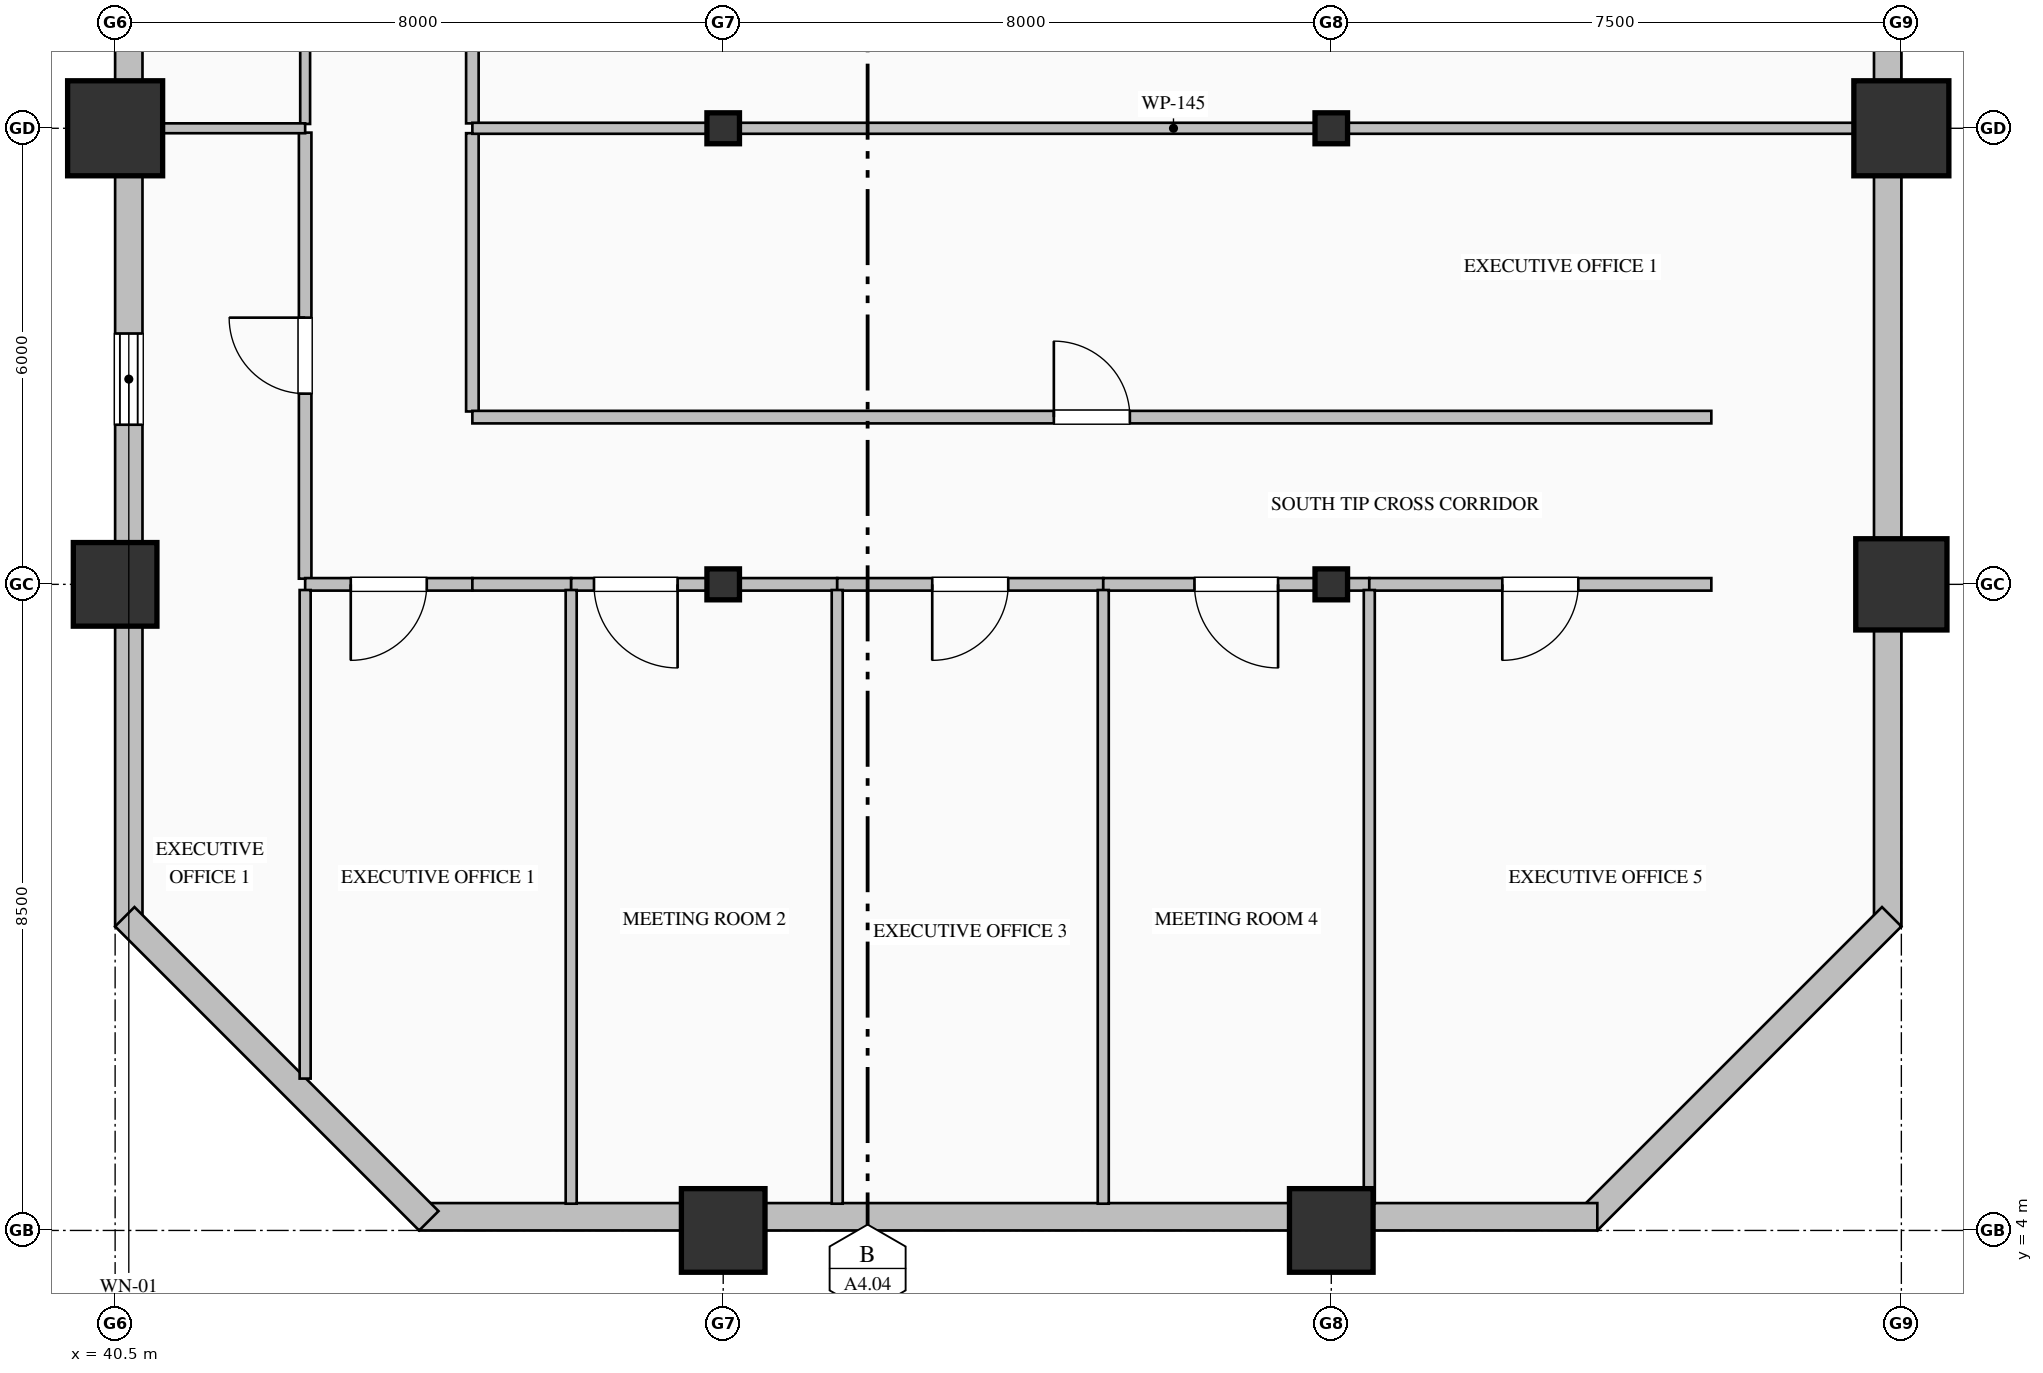
"""IFC4 building model, lengths in metres.
Left out: names, types, materials, properties, quantities, classifications, styles, units other than length and angle.
Written with IfcOpenShell. Run it as: python <this file> out.ifc"""

import sys

from ifc_helpers import new_model, si_unit, direction, frame, frame_2d, origin, origin_2d, place, context, subcontext, project, spatial, rectangle, hollow_rectangle, hollow_circle, i_section, extrude, element, fill, save


model = new_model("IFC4")
c1 = context("Model", 3, precision=1e-05, world=origin(), true_north=direction((0.0, 1.0)))
c2 = subcontext(c1, "Body", "Model", "MODEL_VIEW")
j1 = project(units=[si_unit("LENGTHUNIT", "METRE"), si_unit("PLANEANGLEUNIT", "RADIAN")], contexts=[c1])
p1 = place(None, origin())
s1 = spatial("IfcSite", under=j1, at=p1, CompositionType="ELEMENT")
p2 = place(p1, origin())
s2 = spatial("IfcBuilding", under=s1, at=p2, CompositionType="ELEMENT")
p3 = place(p2, frame((0.0, 0.0, 36.2)))
s3 = spatial("IfcBuildingStorey", under=s2, at=p3, CompositionType="ELEMENT", Elevation=36.2)
p4 = place(p3, frame((40.5, 12.5, 0.0), z_axis=(0.0, 0.0, 1.0), x_axis=(1.0, 0.0, 0.0)))
e1 = element("IfcColumn", 1, at=p4, inside=s3, PredefinedType="COLUMN", context=c2, shape_type="SweptSolid", body=[
    extrude(hollow_rectangle(XDim=1.1, YDim=1.1, WallThickness=0.04, at=origin_2d()), origin(), (0.0, 0.0, 1.0), 4.0),
])
p5 = place(p3, frame((40.5, 18.5, 0.0), z_axis=(0.0, 0.0, 1.0), x_axis=(1.0, 0.0, 0.0)))
e2 = element("IfcColumn", 2, at=p5, inside=s3, PredefinedType="COLUMN", context=c2, shape_type="SweptSolid", body=[
    extrude(hollow_rectangle(XDim=1.25, YDim=1.25, WallThickness=0.045, at=origin_2d()), origin(), (0.0, 0.0, 1.0), 4.0),
])
p6 = place(p3, frame((48.5, 4.0, 0.0), z_axis=(0.0, 0.0, 1.0), x_axis=(1.0, 0.0, 0.0)))
e3 = element("IfcColumn", 3, at=p6, inside=s3, PredefinedType="COLUMN", context=c2, shape_type="SweptSolid", body=[
    extrude(hollow_rectangle(XDim=1.1, YDim=1.1, WallThickness=0.04, at=origin_2d()), origin(), (0.0, 0.0, 1.0), 4.0),
])
for number, where, z_axis, x_axis in (
    (4, (48.5, 12.5, 0.0), (0.0, 0.0, 1.0), (1.0, 0.0, 0.0)),
    (5, (48.5, 18.5, 0.0), (0.0, 0.0, 1.0), (1.0, 0.0, 0.0)),
):
    element("IfcColumn", number, at=place(p3, frame(where, z_axis=z_axis, x_axis=x_axis)), inside=s3, PredefinedType="COLUMN", context=c2, shape_type="SweptSolid", body=[
        extrude(i_section(OverallWidth=0.407, OverallDepth=0.428, WebThickness=0.02, FlangeThickness=0.035, FilletRadius=0.022, at=origin_2d()), origin(), (0.0, 0.0, 1.0), 4.0),
    ])
p7 = place(p3, frame((56.5, 4.0, 0.0), z_axis=(0.0, 0.0, 1.0), x_axis=(1.0, 0.0, 0.0)))
e6 = element("IfcColumn", 6, at=p7, inside=s3, PredefinedType="COLUMN", context=c2, shape_type="SweptSolid", body=[
    extrude(hollow_rectangle(XDim=1.1, YDim=1.1, WallThickness=0.04, at=origin_2d()), origin(), (0.0, 0.0, 1.0), 4.0),
])
for number, where, z_axis, x_axis in (
    (7, (56.5, 12.5, 0.0), (0.0, 0.0, 1.0), (1.0, 0.0, 0.0)),
    (8, (56.5, 18.5, 0.0), (0.0, 0.0, 1.0), (1.0, 0.0, 0.0)),
):
    element("IfcColumn", number, at=place(p3, frame(where, z_axis=z_axis, x_axis=x_axis)), inside=s3, PredefinedType="COLUMN", context=c2, shape_type="SweptSolid", body=[
        extrude(i_section(OverallWidth=0.407, OverallDepth=0.428, WebThickness=0.02, FlangeThickness=0.035, FilletRadius=0.022, at=origin_2d()), origin(), (0.0, 0.0, 1.0), 4.0),
    ])
p8 = place(p3, frame((64.0, 12.5, 0.0), z_axis=(0.0, 0.0, 1.0), x_axis=(1.0, 0.0, 0.0)))
e9 = element("IfcColumn", 9, at=p8, inside=s3, PredefinedType="COLUMN", context=c2, shape_type="SweptSolid", body=[
    extrude(hollow_circle(Radius=0.6, WallThickness=0.04, at=origin_2d()), origin(), (0.0, 0.0, 1.0), 4.0),
])
p9 = place(p3, frame((64.0, 18.5, 0.0), z_axis=(0.0, 0.0, 1.0), x_axis=(1.0, 0.0, 0.0)))
e10 = element("IfcColumn", 10, at=p9, inside=s3, PredefinedType="COLUMN", context=c2, shape_type="SweptSolid", body=[
    extrude(hollow_rectangle(XDim=1.25, YDim=1.25, WallThickness=0.045, at=origin_2d()), origin(), (0.0, 0.0, 1.0), 4.0),
])
p10 = place(p3, frame((40.68, 8.0, 0.0), z_axis=(0.0, 0.0, 1.0), x_axis=(0.0, 1.0, 0.0)))
e11 = element("IfcWall", 11, at=p10, inside=s3, PredefinedType="SOLIDWALL", context=c2, shape_type="SweptSolid", body=[
    extrude(rectangle(XDim=20.36, YDim=0.36, at=frame_2d((10.18, 0.0))), origin(), (0.0, 0.0, 1.0), 3.05),
])
p11 = place(p10, frame((6.6, 0.0, 0.7)))
e12 = element("IfcOpeningElement", 12, at=p11, cuts=e11, PredefinedType="OPENING", context=c2, shape_type="SweptSolid", body=[
    extrude(rectangle(XDim=1.2, YDim=1.85, at=frame_2d((0.6, 0.925))), frame((0.0, 0.19, 0.0), z_axis=(0.0, -1.0, 0.0), x_axis=(1.0, 0.0, 0.0)), (0.0, 0.0, 1.0), 0.38),
])
p12 = place(p10, frame((13.8, 0.0, 0.7)))
e13 = element("IfcOpeningElement", 13, at=p12, cuts=e11, PredefinedType="OPENING", context=c2, shape_type="SweptSolid", body=[
    extrude(rectangle(XDim=1.2, YDim=1.85, at=frame_2d((0.6, 0.925))), frame((0.0, 0.19, 0.0), z_axis=(0.0, -1.0, 0.0), x_axis=(1.0, 0.0, 0.0)), (0.0, 0.0, 1.0), 0.38),
])
p13 = place(p3, frame((63.82, 36.05, 0.0), z_axis=(0.0, 0.0, 1.0), x_axis=(0.0, -1.0, 0.0)))
e14 = element("IfcWall", 14, at=p13, inside=s3, PredefinedType="SOLIDWALL", context=c2, shape_type="SweptSolid", body=[
    extrude(rectangle(XDim=28.05, YDim=0.36, at=frame_2d((14.025, 0.0))), origin(), (0.0, 0.0, 1.0), 3.25),
])
p14 = place(p13, frame((9.75, 0.0, 0.85)))
e15 = element("IfcOpeningElement", 15, at=p14, cuts=e14, PredefinedType="OPENING", context=c2, shape_type="SweptSolid", body=[
    extrude(rectangle(XDim=2.1, YDim=2.05, at=frame_2d((1.05, 1.025))), frame((0.0, 0.19, 0.0), z_axis=(0.0, -1.0, 0.0), x_axis=(1.0, 0.0, 0.0)), (0.0, 0.0, 1.0), 0.38),
])
p15 = place(p13, frame((13.2, 0.0, 0.8)))
e16 = element("IfcOpeningElement", 16, at=p15, cuts=e14, PredefinedType="OPENING", context=c2, shape_type="SweptSolid", body=[
    extrude(rectangle(XDim=2.4, YDim=2.15, at=frame_2d((1.2, 1.075))), frame((0.0, 0.19, 0.0), z_axis=(0.0, -1.0, 0.0), x_axis=(1.0, 0.0, 0.0)), (0.0, 0.0, 1.0), 0.38),
])
p16 = place(p3, frame((63.873, 8.127, 0.0), z_axis=(0.0, 0.0, 1.0), x_axis=(-0.707106781187, -0.707106781187, 0.0)))
e17 = element("IfcWall", 17, at=p16, inside=s3, PredefinedType="SOLIDWALL", context=c2, shape_type="SweptSolid", body=[
    extrude(rectangle(XDim=5.657, YDim=0.36, at=frame_2d((2.828, 0.0))), origin(), (0.0, 0.0, 1.0), 3.75),
])
p17 = place(p3, frame((60.0, 4.18, 0.0), z_axis=(0.0, 0.0, 1.0), x_axis=(-1.0, 0.0, 0.0)))
e18 = element("IfcWall", 18, at=p17, inside=s3, PredefinedType="SOLIDWALL", context=c2, shape_type="SweptSolid", body=[
    extrude(rectangle(XDim=15.5, YDim=0.36, at=frame_2d((7.75, 0.0))), origin(), (0.0, 0.0, 1.0), 3.25),
])
p18 = place(p3, frame((44.627, 4.127, 0.0), z_axis=(0.0, 0.0, 1.0), x_axis=(-0.707106781187, 0.707106781187, 0.0)))
e19 = element("IfcWall", 19, at=p18, inside=s3, PredefinedType="SOLIDWALL", context=c2, shape_type="SweptSolid", body=[
    extrude(rectangle(XDim=5.657, YDim=0.36, at=frame_2d((2.828, 0.0))), origin(), (0.0, 0.0, 1.0), 3.75),
])
p19 = place(p3, frame((45.2, 18.436, 0.0), z_axis=(0.0, 0.0, 1.0), x_axis=(0.0, -1.0, 0.0)))
e20 = element("IfcWall", 20, at=p19, inside=s3, PredefinedType="PARTITIONING", context=c2, shape_type="SweptSolid", body=[
    extrude(rectangle(XDim=3.661, YDim=0.165, at=frame_2d((1.831, 0.0))), origin(), (0.0, 0.0, 1.0), 3.75),
])
p20 = place(p3, frame((45.2, 23.135, 0.0), z_axis=(0.0, 0.0, 1.0), x_axis=(0.0, -1.0, 0.0)))
e21 = element("IfcWall", 21, at=p20, inside=s3, PredefinedType="PARTITIONING", context=c2, shape_type="SweptSolid", body=[
    extrude(rectangle(XDim=4.571, YDim=0.165, at=frame_2d((2.286, 0.0))), origin(), (0.0, 0.0, 1.0), 3.75),
])
p21 = place(p20, frame((1.736, 0.0, 0.0)))
e22 = element("IfcOpeningElement", 22, at=p21, cuts=e21, PredefinedType="OPENING", context=c2, shape_type="SweptSolid", body=[
    extrude(rectangle(XDim=1.1, YDim=2.2, at=frame_2d((0.55, 1.1))), frame((0.0, 0.093, 0.0), z_axis=(0.0, -1.0, 0.0), x_axis=(1.0, 0.0, 0.0)), (0.0, 0.0, 1.0), 0.185),
])
p22 = place(p3, frame((43.0, 12.574, 0.0), z_axis=(0.0, 0.0, 1.0), x_axis=(0.0, 1.0, 0.0)))
e23 = element("IfcWall", 23, at=p22, inside=s3, PredefinedType="PARTITIONING", context=c2, shape_type="SweptSolid", body=[
    extrude(rectangle(XDim=5.869, YDim=0.165, at=frame_2d((2.934, 0.0))), origin(), (0.0, 0.0, 1.0), 3.75),
])
p23 = place(p22, frame((2.434, 0.0, 0.0)))
e24 = element("IfcOpeningElement", 24, at=p23, cuts=e23, PredefinedType="OPENING", context=c2, shape_type="SweptSolid", body=[
    extrude(rectangle(XDim=1.0, YDim=2.15, at=frame_2d((0.5, 1.075))), frame((0.0, 0.093, 0.0), z_axis=(0.0, -1.0, 0.0), x_axis=(1.0, 0.0, 0.0)), (0.0, 0.0, 1.0), 0.185),
])
p24 = place(p3, frame((43.0, 18.557, 0.0), z_axis=(0.0, 0.0, 1.0), x_axis=(0.0, 1.0, 0.0)))
e25 = element("IfcWall", 25, at=p24, inside=s3, PredefinedType="PARTITIONING", context=c2, shape_type="SweptSolid", body=[
    extrude(rectangle(XDim=5.886, YDim=0.13, at=frame_2d((2.943, 0.0))), origin(), (0.0, 0.0, 1.0), 3.75),
])
p25 = place(p24, frame((2.443, 0.0, 0.0)))
e26 = element("IfcOpeningElement", 26, at=p25, cuts=e25, PredefinedType="OPENING", context=c2, shape_type="SweptSolid", body=[
    extrude(rectangle(XDim=1.0, YDim=2.15, at=frame_2d((0.5, 1.075))), frame((0.0, 0.075, 0.0), z_axis=(0.0, -1.0, 0.0), x_axis=(1.0, 0.0, 0.0)), (0.0, 0.0, 1.0), 0.15),
])
p26 = place(p3, frame((45.2, 12.5, 0.0), z_axis=(0.0, 0.0, 1.0), x_axis=(-1.0, 0.0, 0.0)))
e27 = element("IfcWall", 27, at=p26, inside=s3, PredefinedType="PARTITIONING", context=c2, shape_type="SweptSolid", body=[
    extrude(rectangle(XDim=2.2, YDim=0.165, at=frame_2d((1.1, 0.0))), origin(), (0.0, 0.0, 1.0), 3.042),
])
p27 = place(p26, frame((0.6, 0.0, 0.0)))
e28 = element("IfcOpeningElement", 28, at=p27, cuts=e27, PredefinedType="OPENING", context=c2, shape_type="SweptSolid", body=[
    extrude(rectangle(XDim=1.0, YDim=2.15, at=frame_2d((0.5, 1.075))), frame((0.0, 0.093, 0.0), z_axis=(0.0, -1.0, 0.0), x_axis=(1.0, 0.0, 0.0)), (0.0, 0.0, 1.0), 0.185),
])
p28 = place(p3, frame((45.2, 14.7, 0.0), z_axis=(0.0, 0.0, 1.0), x_axis=(1.0, 0.0, 0.0)))
e29 = element("IfcWall", 29, at=p28, inside=s3, PredefinedType="PARTITIONING", context=c2, shape_type="SweptSolid", body=[
    extrude(rectangle(XDim=16.3, YDim=0.165, at=frame_2d((8.15, 0.0))), origin(), (0.0, 0.0, 1.0), 3.75),
])
p29 = place(p28, frame((7.65, 0.0, 0.0)))
e30 = element("IfcOpeningElement", 30, at=p29, cuts=e29, PredefinedType="OPENING", context=c2, shape_type="SweptSolid", body=[
    extrude(rectangle(XDim=1.0, YDim=2.15, at=frame_2d((0.5, 1.075))), frame((0.0, 0.093, 0.0), z_axis=(0.0, -1.0, 0.0), x_axis=(1.0, 0.0, 0.0)), (0.0, 0.0, 1.0), 0.185),
])
p30 = place(p3, frame((46.5, 12.5, 0.0), z_axis=(0.0, 0.0, 1.0), x_axis=(-1.0, 0.0, 0.0)))
e31 = element("IfcWall", 31, at=p30, inside=s3, PredefinedType="PARTITIONING", context=c2, shape_type="SweptSolid", body=[
    extrude(rectangle(XDim=1.3, YDim=0.165, at=frame_2d((0.65, 0.0))), origin(), (0.0, 0.0, 1.0), 3.042),
])
p31 = place(p3, frame((50.0, 12.5, 0.0), z_axis=(0.0, 0.0, 1.0), x_axis=(-1.0, 0.0, 0.0)))
e32 = element("IfcWall", 32, at=p31, inside=s3, PredefinedType="PARTITIONING", context=c2, shape_type="SweptSolid", body=[
    extrude(rectangle(XDim=3.5, YDim=0.165, at=frame_2d((1.75, 0.0))), origin(), (0.0, 0.0, 1.0), 3.042),
])
p32 = place(p31, frame((2.1, 0.0, 0.0)))
e33 = element("IfcOpeningElement", 33, at=p32, cuts=e32, PredefinedType="OPENING", context=c2, shape_type="SweptSolid", body=[
    extrude(rectangle(XDim=1.1, YDim=2.2, at=frame_2d((0.55, 1.1))), frame((0.0, 0.093, 0.0), z_axis=(0.0, -1.0, 0.0), x_axis=(1.0, 0.0, 0.0)), (0.0, 0.0, 1.0), 0.185),
])
p33 = place(p3, frame((53.5, 12.5, 0.0), z_axis=(0.0, 0.0, 1.0), x_axis=(-1.0, 0.0, 0.0)))
e34 = element("IfcWall", 34, at=p33, inside=s3, PredefinedType="PARTITIONING", context=c2, shape_type="SweptSolid", body=[
    extrude(rectangle(XDim=3.5, YDim=0.165, at=frame_2d((1.75, 0.0))), origin(), (0.0, 0.0, 1.0), 3.042),
])
p34 = place(p33, frame((1.25, 0.0, 0.0)))
e35 = element("IfcOpeningElement", 35, at=p34, cuts=e34, PredefinedType="OPENING", context=c2, shape_type="SweptSolid", body=[
    extrude(rectangle(XDim=1.0, YDim=2.15, at=frame_2d((0.5, 1.075))), frame((0.0, 0.093, 0.0), z_axis=(0.0, -1.0, 0.0), x_axis=(1.0, 0.0, 0.0)), (0.0, 0.0, 1.0), 0.185),
])
p35 = place(p3, frame((57.0, 12.5, 0.0), z_axis=(0.0, 0.0, 1.0), x_axis=(-1.0, 0.0, 0.0)))
e36 = element("IfcWall", 36, at=p35, inside=s3, PredefinedType="PARTITIONING", context=c2, shape_type="SweptSolid", body=[
    extrude(rectangle(XDim=3.5, YDim=0.165, at=frame_2d((1.75, 0.0))), origin(), (0.0, 0.0, 1.0), 3.042),
])
p36 = place(p35, frame((1.2, 0.0, 0.0)))
e37 = element("IfcOpeningElement", 37, at=p36, cuts=e36, PredefinedType="OPENING", context=c2, shape_type="SweptSolid", body=[
    extrude(rectangle(XDim=1.1, YDim=2.2, at=frame_2d((0.55, 1.1))), frame((0.0, 0.093, 0.0), z_axis=(0.0, -1.0, 0.0), x_axis=(1.0, 0.0, 0.0)), (0.0, 0.0, 1.0), 0.185),
])
p37 = place(p3, frame((61.5, 12.5, 0.0), z_axis=(0.0, 0.0, 1.0), x_axis=(-1.0, 0.0, 0.0)))
e38 = element("IfcWall", 38, at=p37, inside=s3, PredefinedType="PARTITIONING", context=c2, shape_type="SweptSolid", body=[
    extrude(rectangle(XDim=4.5, YDim=0.165, at=frame_2d((2.25, 0.0))), origin(), (0.0, 0.0, 1.0), 3.042),
])
p38 = place(p37, frame((1.75, 0.0, 0.0)))
e39 = element("IfcOpeningElement", 39, at=p38, cuts=e38, PredefinedType="OPENING", context=c2, shape_type="SweptSolid", body=[
    extrude(rectangle(XDim=1.0, YDim=2.15, at=frame_2d((0.5, 1.075))), frame((0.0, 0.093, 0.0), z_axis=(0.0, -1.0, 0.0), x_axis=(1.0, 0.0, 0.0)), (0.0, 0.0, 1.0), 0.185),
])
p39 = place(p3, frame((45.2, 18.5, 0.0), z_axis=(0.0, 0.0, 1.0), x_axis=(1.0, 0.0, 0.0)))
e40 = element("IfcWall", 40, at=p39, inside=s3, PredefinedType="PARTITIONING", context=c2, shape_type="SweptSolid", body=[
    extrude(rectangle(XDim=18.448, YDim=0.145, at=frame_2d((9.224, 0.0))), origin(), (0.0, 0.0, 1.0), 3.042),
])
p40 = place(p3, frame((40.852, 18.5, 0.0), z_axis=(0.0, 0.0, 1.0), x_axis=(1.0, 0.0, 0.0)))
e41 = element("IfcWall", 41, at=p40, inside=s3, PredefinedType="PARTITIONING", context=c2, shape_type="SweptSolid", body=[
    extrude(rectangle(XDim=2.148, YDim=0.13, at=frame_2d((1.074, 0.0))), origin(), (0.0, 0.0, 1.0), 3.042),
])
p41 = place(p3, frame((43.0, 12.426, 0.0), z_axis=(0.0, 0.0, 1.0), x_axis=(0.0, -1.0, 0.0)))
e42 = element("IfcWall", 42, at=p41, inside=s3, PredefinedType="PARTITIONING", context=c2, shape_type="SweptSolid", body=[
    extrude(rectangle(XDim=6.428, YDim=0.145, at=frame_2d((3.214, 0.0))), origin(), (0.0, 0.0, 1.0), 3.75),
])
for number, where, z_axis, x_axis in (
    (43, (46.5, 12.426, 0.0), (0.0, 0.0, 1.0), (0.0, -1.0, 0.0)),
    (44, (50.0, 12.426, 0.0), (0.0, 0.0, 1.0), (0.0, -1.0, 0.0)),
    (45, (53.5, 12.426, 0.0), (0.0, 0.0, 1.0), (0.0, -1.0, 0.0)),
    (46, (57.0, 12.426, 0.0), (0.0, 0.0, 1.0), (0.0, -1.0, 0.0)),
):
    element("IfcWall", number, at=place(p3, frame(where, z_axis=z_axis, x_axis=x_axis)), inside=s3, PredefinedType="PARTITIONING", context=c2, shape_type="SweptSolid", body=[
        extrude(rectangle(XDim=8.073, YDim=0.145, at=frame_2d((4.037, 0.0))), origin(), (0.0, 0.0, 1.0), 3.75),
    ])
p42 = place(p11, origin())
e47 = element("IfcWindow", 47, at=p42, inside=s3, PartitioningType="DOUBLE_PANEL_VERTICAL", PredefinedType="WINDOW", context=c2, shape_type="SweptSolid", body=[
    extrude(rectangle(XDim=1.2, YDim=1.85, at=frame_2d((0.6, 0.925))), frame((0.0, 0.15, 0.0), z_axis=(0.0, -1.0, 0.0), x_axis=(1.0, 0.0, 0.0)), (0.0, 0.0, 1.0), 0.06),
])
fill(e12, e47)
p43 = place(p29, origin())
e48 = element("IfcDoor", 48, at=p43, inside=s3, OperationType="SINGLE_SWING_LEFT", PredefinedType="DOOR", context=c2, shape_type="SweptSolid", body=[
    extrude(rectangle(XDim=1.0, YDim=2.15, at=frame_2d((0.5, 1.075))), frame((0.0, 0.025, 0.0), z_axis=(0.0, -1.0, 0.0), x_axis=(1.0, 0.0, 0.0)), (0.0, 0.0, 1.0), 0.05),
])
fill(e30, e48)
p44 = place(p23, origin())
e49 = element("IfcDoor", 49, at=p44, inside=s3, OperationType="SINGLE_SWING_RIGHT", PredefinedType="DOOR", context=c2, shape_type="SweptSolid", body=[
    extrude(rectangle(XDim=1.0, YDim=2.15, at=frame_2d((0.5, 1.075))), frame((0.0, 0.025, 0.0), z_axis=(0.0, -1.0, 0.0), x_axis=(1.0, 0.0, 0.0)), (0.0, 0.0, 1.0), 0.05),
])
fill(e24, e49)
p45 = place(p27, origin())
e50 = element("IfcDoor", 50, at=p45, inside=s3, OperationType="SINGLE_SWING_RIGHT", PredefinedType="DOOR", context=c2, shape_type="SweptSolid", body=[
    extrude(rectangle(XDim=1.0, YDim=2.15, at=frame_2d((0.5, 1.075))), frame((0.0, 0.025, 0.0), z_axis=(0.0, -1.0, 0.0), x_axis=(1.0, 0.0, 0.0)), (0.0, 0.0, 1.0), 0.05),
])
fill(e28, e50)
p46 = place(p32, origin())
e51 = element("IfcDoor", 51, at=p46, inside=s3, OperationType="SINGLE_SWING_LEFT", PredefinedType="DOOR", context=c2, shape_type="SweptSolid", body=[
    extrude(rectangle(XDim=1.1, YDim=2.2, at=frame_2d((0.55, 1.1))), frame((0.0, 0.025, 0.0), z_axis=(0.0, -1.0, 0.0), x_axis=(1.0, 0.0, 0.0)), (0.0, 0.0, 1.0), 0.05),
])
fill(e33, e51)
p47 = place(p34, origin())
e52 = element("IfcDoor", 52, at=p47, inside=s3, OperationType="SINGLE_SWING_RIGHT", PredefinedType="DOOR", context=c2, shape_type="SweptSolid", body=[
    extrude(rectangle(XDim=1.0, YDim=2.15, at=frame_2d((0.5, 1.075))), frame((0.0, 0.025, 0.0), z_axis=(0.0, -1.0, 0.0), x_axis=(1.0, 0.0, 0.0)), (0.0, 0.0, 1.0), 0.05),
])
fill(e35, e52)
p48 = place(p36, origin())
e53 = element("IfcDoor", 53, at=p48, inside=s3, OperationType="SINGLE_SWING_LEFT", PredefinedType="DOOR", context=c2, shape_type="SweptSolid", body=[
    extrude(rectangle(XDim=1.1, YDim=2.2, at=frame_2d((0.55, 1.1))), frame((0.0, 0.025, 0.0), z_axis=(0.0, -1.0, 0.0), x_axis=(1.0, 0.0, 0.0)), (0.0, 0.0, 1.0), 0.05),
])
fill(e37, e53)
p49 = place(p38, origin())
e54 = element("IfcDoor", 54, at=p49, inside=s3, OperationType="SINGLE_SWING_RIGHT", PredefinedType="DOOR", context=c2, shape_type="SweptSolid", body=[
    extrude(rectangle(XDim=1.0, YDim=2.15, at=frame_2d((0.5, 1.075))), frame((0.0, 0.025, 0.0), z_axis=(0.0, -1.0, 0.0), x_axis=(1.0, 0.0, 0.0)), (0.0, 0.0, 1.0), 0.05),
])
fill(e39, e54)
save(model, sys.argv[1])
